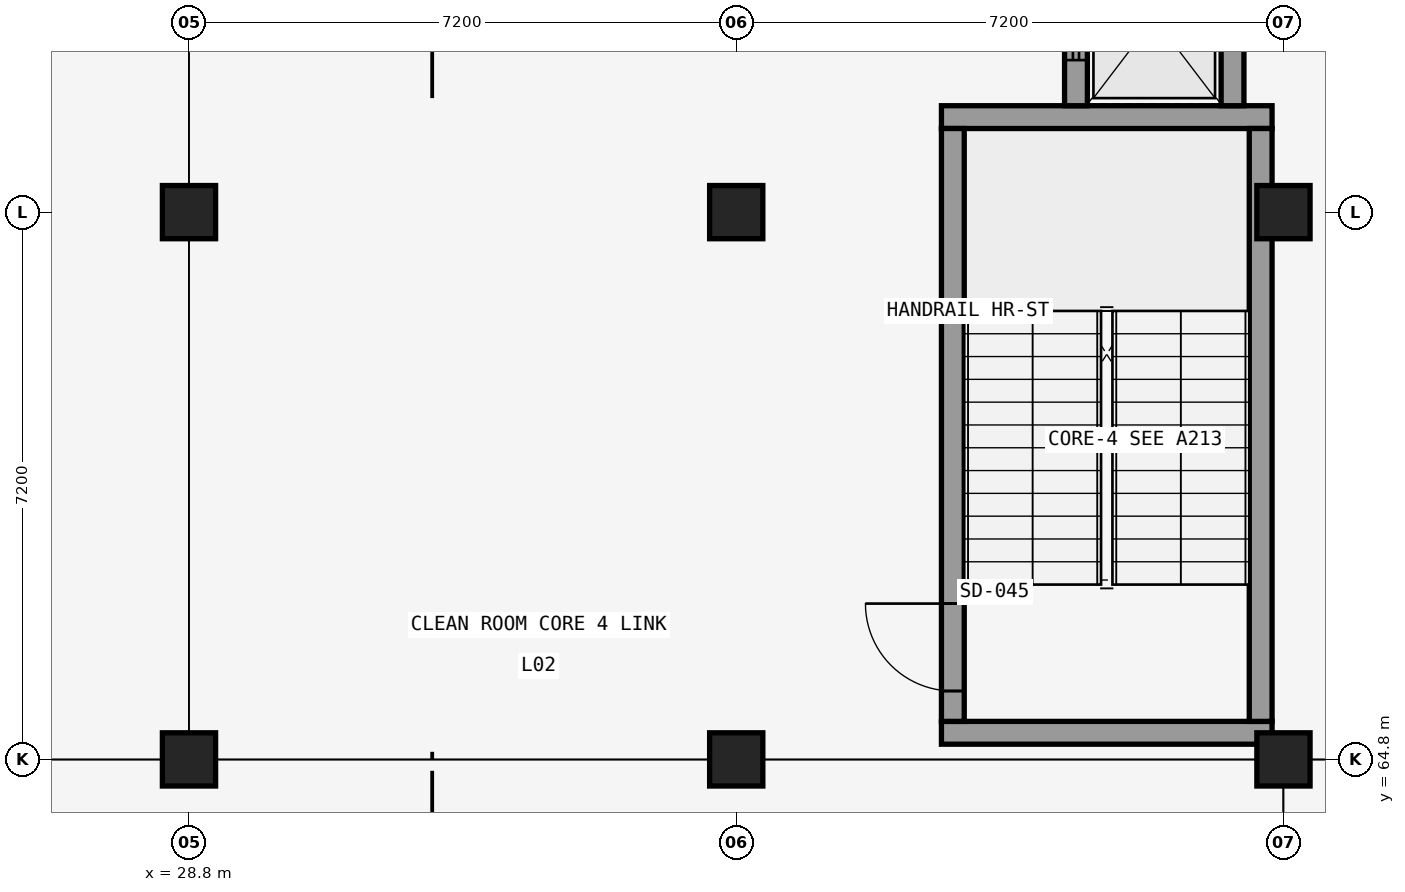
"""IFC4 building model, lengths in metres.
Left out: names, types, materials, properties, quantities, classifications, styles, units other than length and angle.
Written with IfcOpenShell. Run it as: python <this file> out.ifc"""

import sys

from ifc_helpers import new_model, si_unit, direction, frame, frame_2d, origin, origin_2d, place, context, subcontext, project, spatial, rectangle, extrude, element, fill, save


model = new_model("IFC4")
c1 = context("Model", 3, precision=1e-05, world=origin(), true_north=direction((0.0, 1.0)))
c2 = subcontext(c1, "Body", "Model", "MODEL_VIEW")
j1 = project(units=[si_unit("LENGTHUNIT", "METRE"), si_unit("PLANEANGLEUNIT", "RADIAN")], contexts=[c1])
p1 = place(None, origin())
s1 = spatial("IfcSite", under=j1, at=p1, CompositionType="ELEMENT")
p2 = place(p1, origin())
s2 = spatial("IfcBuilding", under=s1, at=p2, CompositionType="ELEMENT")
p3 = place(p2, frame((0.0, 0.0, 8.96)))
s3 = spatial("IfcBuildingStorey", under=s2, at=p3, CompositionType="ELEMENT", Elevation=8.96)
for number, where, z_axis, x_axis in (
    (1, (28.8, 64.8, 0.0), (0.0, 0.0, 1.0), (1.0, 0.0, 0.0)),
    (2, (28.8, 72.0, 0.0), (0.0, 0.0, 1.0), (1.0, 0.0, 0.0)),
    (3, (36.0, 64.8, 0.0), (0.0, 0.0, 1.0), (1.0, 0.0, 0.0)),
    (4, (36.0, 72.0, 0.0), (0.0, 0.0, 1.0), (1.0, 0.0, 0.0)),
    (5, (43.2, 64.8, 0.0), (0.0, 0.0, 1.0), (1.0, 0.0, 0.0)),
    (6, (43.2, 72.0, 0.0), (0.0, 0.0, 1.0), (1.0, 0.0, 0.0)),
):
    element("IfcColumn", number, at=place(p3, frame(where, z_axis=z_axis, x_axis=x_axis)), inside=s3, PredefinedType="COLUMN", context=c2, shape_type="SweptSolid", body=[
        extrude(rectangle(XDim=0.7, YDim=0.7, at=origin_2d()), origin(), (0.0, 0.0, 1.0), 4.16),
    ])
for number, where, z_axis, x_axis in (
    (7, (38.7, 65.15, 0.0), (0.0, 0.0, 1.0), (1.0, 0.0, 0.0)),
    (8, (38.7, 73.25, 0.0), (0.0, 0.0, 1.0), (1.0, 0.0, 0.0)),
):
    element("IfcWall", number, at=place(p3, frame(where, z_axis=z_axis, x_axis=x_axis)), inside=s3, PredefinedType="SHEAR", context=c2, shape_type="SweptSolid", body=[
        extrude(rectangle(XDim=4.35, YDim=0.3, at=frame_2d((2.175, 0.0))), origin(), (0.0, 0.0, 1.0), 3.81),
    ])
p4 = place(p3, frame((38.85, 65.3, 0.0), z_axis=(0.0, 0.0, 1.0), x_axis=(0.0, 1.0, 0.0)))
e9 = element("IfcWall", 9, at=p4, inside=s3, PredefinedType="SHEAR", context=c2, shape_type="SweptSolid", body=[
    extrude(rectangle(XDim=7.8, YDim=0.3, at=frame_2d((3.9, 0.0))), origin(), (0.0, 0.0, 1.0), 3.81),
])
p5 = place(p4, frame((0.4, 0.0, 0.0)))
e10 = element("IfcOpeningElement", 10, at=p5, cuts=e9, PredefinedType="OPENING", context=c2, shape_type="SweptSolid", body=[
    extrude(rectangle(XDim=1.15, YDim=2.2, at=frame_2d((0.575, 1.1))), frame((0.0, 0.16, 0.0), z_axis=(0.0, -1.0, 0.0), x_axis=(1.0, 0.0, 0.0)), (0.0, 0.0, 1.0), 0.32),
])
p6 = place(p3, frame((42.9, 65.3, 0.0), z_axis=(0.0, 0.0, 1.0), x_axis=(0.0, 1.0, 0.0)))
e11 = element("IfcWall", 11, at=p6, inside=s3, PredefinedType="SHEAR", context=c2, shape_type="SweptSolid", body=[
    extrude(rectangle(XDim=7.8, YDim=0.3, at=frame_2d((3.9, 0.0))), origin(), (0.0, 0.0, 1.0), 3.81),
])
p7 = place(p3, frame((40.47, 73.4, 0.0), z_axis=(0.0, 0.0, 1.0), x_axis=(0.0, 1.0, 0.0)))
e12 = element("IfcWall", 12, at=p7, inside=s3, PredefinedType="SHEAR", context=c2, shape_type="SweptSolid", body=[
    extrude(rectangle(XDim=2.28, YDim=0.3, at=frame_2d((1.14, 0.0))), origin(), (0.0, 0.0, 1.0), 3.81),
])
p8 = place(p7, frame((0.6, 0.0, 0.0)))
e13 = element("IfcOpeningElement", 13, at=p8, cuts=e12, PredefinedType="OPENING", context=c2, shape_type="SweptSolid", body=[
    extrude(rectangle(XDim=1.1, YDim=2.2, at=frame_2d((0.55, 1.1))), frame((0.0, 0.16, 0.0), z_axis=(0.0, -1.0, 0.0), x_axis=(1.0, 0.0, 0.0)), (0.0, 0.0, 1.0), 0.32),
])
p9 = place(p3, frame((42.53, 73.4, 0.0), z_axis=(0.0, 0.0, 1.0), x_axis=(0.0, 1.0, 0.0)))
e14 = element("IfcWall", 14, at=p9, inside=s3, PredefinedType="SHEAR", context=c2, shape_type="SweptSolid", body=[
    extrude(rectangle(XDim=2.28, YDim=0.3, at=frame_2d((1.14, 0.0))), origin(), (0.0, 0.0, 1.0), 3.81),
])
p10 = place(p5, frame((1.15, 0.0, 0.0), z_axis=(0.0, 0.0, 1.0), x_axis=(-1.0, 0.0, 0.0)))
e15 = element("IfcDoor", 15, at=p10, inside=s3, OperationType="SINGLE_SWING_RIGHT", PredefinedType="DOOR", context=c2, shape_type="SweptSolid", body=[
    extrude(rectangle(XDim=1.15, YDim=2.2, at=frame_2d((0.575, 1.1))), frame((0.0, 0.025, 0.0), z_axis=(0.0, -1.0, 0.0), x_axis=(1.0, 0.0, 0.0)), (0.0, 0.0, 1.0), 0.05),
])
fill(e10, e15)
p11 = place(p8, origin())
e16 = element("IfcDoor", 16, at=p11, inside=s3, OperationType="SLIDING_TO_LEFT", PredefinedType="DOOR", context=c2, shape_type="SweptSolid", body=[
    extrude(rectangle(XDim=1.1, YDim=2.2, at=frame_2d((0.55, 1.1))), frame((0.0, 0.025, 0.0), z_axis=(0.0, -1.0, 0.0), x_axis=(1.0, 0.0, 0.0)), (0.0, 0.0, 1.0), 0.05),
])
fill(e13, e16)
save(model, sys.argv[1])
